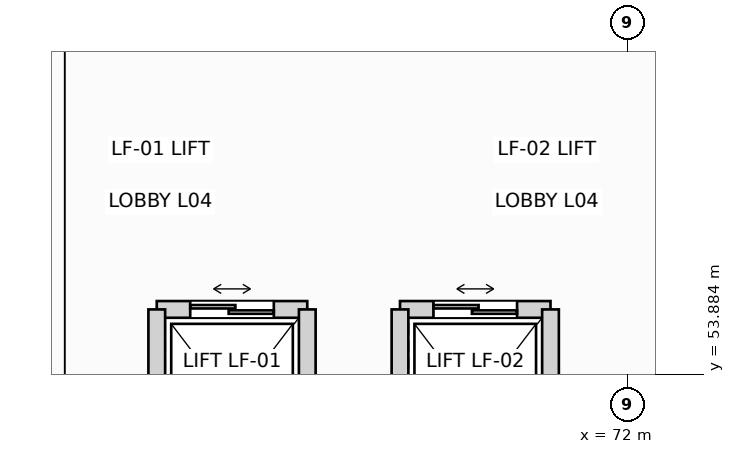
"""IFC4 building model, lengths in metres.
Left out: names, types, materials, properties, quantities, classifications, styles, units other than length and angle.
Written with IfcOpenShell. Run it as: python <this file> out.ifc"""

import sys

from ifc_helpers import new_model, si_unit, direction, frame, frame_2d, origin, place, context, subcontext, project, spatial, rectangle, extrude, element, fill, save


model = new_model("IFC4")
c1 = context("Model", 3, precision=1e-05, world=origin(), true_north=direction((0.0, 1.0)))
c2 = subcontext(c1, "Body", "Model", "MODEL_VIEW")
j1 = project(units=[si_unit("LENGTHUNIT", "METRE"), si_unit("PLANEANGLEUNIT", "RADIAN")], contexts=[c1])
p1 = place(None, origin())
s1 = spatial("IfcSite", under=j1, at=p1, CompositionType="ELEMENT")
p2 = place(p1, origin())
s2 = spatial("IfcBuilding", under=s1, at=p2, CompositionType="ELEMENT")
p3 = place(p2, frame((0.0, 0.0, 21.6)))
s3 = spatial("IfcBuildingStorey", under=s2, at=p3, CompositionType="ELEMENT", Elevation=21.6)
p4 = place(p3, frame((65.81, 54.74, 0.0), z_axis=(0.0, 0.0, 1.0), x_axis=(1.0, 0.0, 0.0)))
e1 = element("IfcWall", 1, at=p4, inside=s3, PredefinedType="PARTITIONING", context=c2, shape_type="SweptSolid", body=[
    extrude(rectangle(XDim=1.98, YDim=0.22, at=frame_2d((0.99, 0.0))), origin(), (0.0, 0.0, 1.0), 4.505),
])
p5 = place(p4, frame((0.44, 0.0, 0.0)))
e2 = element("IfcOpeningElement", 2, at=p5, cuts=e1, PredefinedType="OPENING", context=c2, shape_type="SweptSolid", body=[
    extrude(rectangle(XDim=1.1, YDim=2.18, at=frame_2d((0.55, 1.09))), frame((0.0, 0.12, 0.0), z_axis=(0.0, -1.0, 0.0), x_axis=(1.0, 0.0, 0.0)), (0.0, 0.0, 1.0), 0.24),
])
for number, where, z_axis, x_axis in (
    (3, (65.81, 52.26, 0.0), (0.0, 0.0, 1.0), (0.0, 1.0, 0.0)),
    (4, (67.79, 52.26, 0.0), (0.0, 0.0, 1.0), (0.0, 1.0, 0.0)),
):
    element("IfcWall", number, at=place(p3, frame(where, z_axis=z_axis, x_axis=x_axis)), inside=s3, PredefinedType="PARTITIONING", context=c2, shape_type="SweptSolid", body=[
        extrude(rectangle(XDim=2.48, YDim=0.22, at=frame_2d((1.24, 0.0))), origin(), (0.0, 0.0, 1.0), 4.505),
    ])
p6 = place(p3, frame((69.01, 54.74, 0.0), z_axis=(0.0, 0.0, 1.0), x_axis=(1.0, 0.0, 0.0)))
e5 = element("IfcWall", 5, at=p6, inside=s3, PredefinedType="PARTITIONING", context=c2, shape_type="SweptSolid", body=[
    extrude(rectangle(XDim=1.98, YDim=0.22, at=frame_2d((0.99, 0.0))), origin(), (0.0, 0.0, 1.0), 4.505),
])
p7 = place(p6, frame((0.44, 0.0, 0.0)))
e6 = element("IfcOpeningElement", 6, at=p7, cuts=e5, PredefinedType="OPENING", context=c2, shape_type="SweptSolid", body=[
    extrude(rectangle(XDim=1.1, YDim=2.18, at=frame_2d((0.55, 1.09))), frame((0.0, 0.12, 0.0), z_axis=(0.0, -1.0, 0.0), x_axis=(1.0, 0.0, 0.0)), (0.0, 0.0, 1.0), 0.24),
])
for number, where, z_axis, x_axis in (
    (7, (69.01, 52.26, 0.0), (0.0, 0.0, 1.0), (0.0, 1.0, 0.0)),
    (8, (70.99, 52.26, 0.0), (0.0, 0.0, 1.0), (0.0, 1.0, 0.0)),
):
    element("IfcWall", number, at=place(p3, frame(where, z_axis=z_axis, x_axis=x_axis)), inside=s3, PredefinedType="PARTITIONING", context=c2, shape_type="SweptSolid", body=[
        extrude(rectangle(XDim=2.48, YDim=0.22, at=frame_2d((1.24, 0.0))), origin(), (0.0, 0.0, 1.0), 4.505),
    ])
p8 = place(p5, origin())
e9 = element("IfcDoor", 9, at=p8, inside=s3, OperationType="DOUBLE_DOOR_SLIDING", PredefinedType="DOOR", context=c2, shape_type="SweptSolid", body=[
    extrude(rectangle(XDim=1.1, YDim=2.18, at=frame_2d((0.55, 1.09))), frame((0.0, 0.025, 0.0), z_axis=(0.0, -1.0, 0.0), x_axis=(1.0, 0.0, 0.0)), (0.0, 0.0, 1.0), 0.05),
])
fill(e2, e9)
p9 = place(p7, origin())
e10 = element("IfcDoor", 10, at=p9, inside=s3, OperationType="DOUBLE_DOOR_SLIDING", PredefinedType="DOOR", context=c2, shape_type="SweptSolid", body=[
    extrude(rectangle(XDim=1.1, YDim=2.18, at=frame_2d((0.55, 1.09))), frame((0.0, 0.025, 0.0), z_axis=(0.0, -1.0, 0.0), x_axis=(1.0, 0.0, 0.0)), (0.0, 0.0, 1.0), 0.05),
])
fill(e6, e10)
save(model, sys.argv[1])
